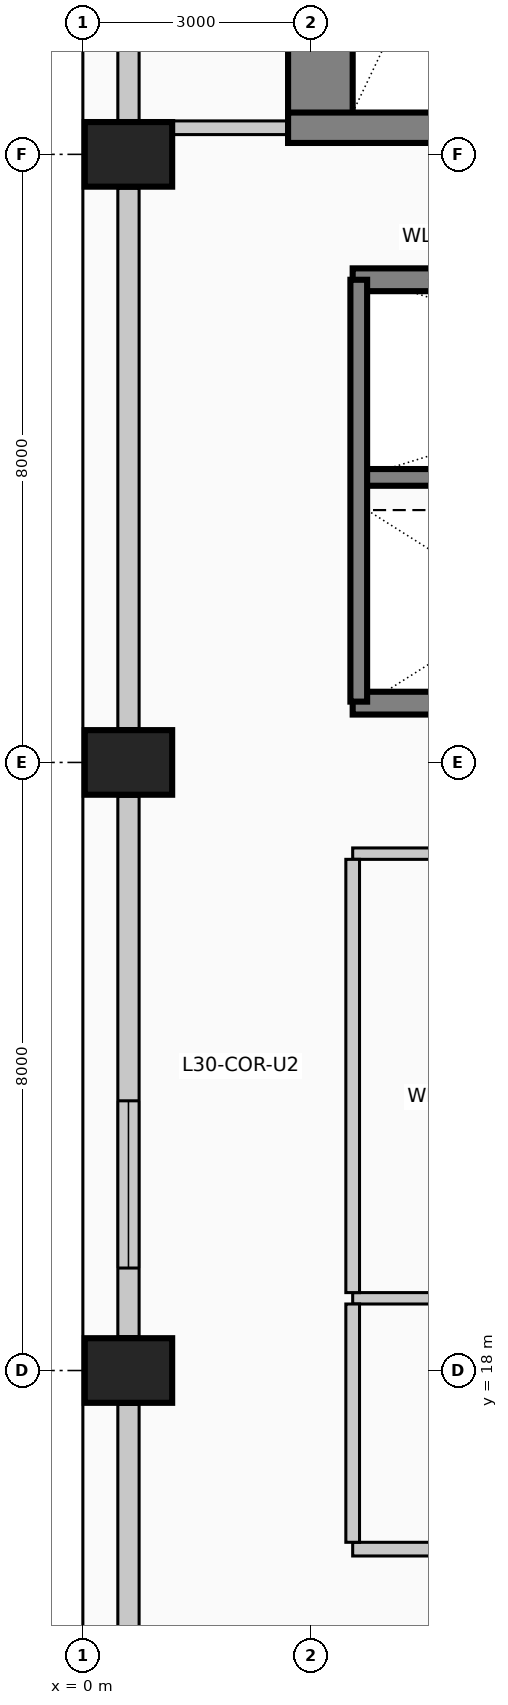
"""IFC4 building model, lengths in metres.
Left out: names, types, materials, properties, quantities, classifications, styles, units other than length and angle.
Written with IfcOpenShell. Run it as: python <this file> out.ifc"""

import sys

from ifc_helpers import new_model, si_unit, direction, frame, frame_2d, origin, origin_2d, place, context, subcontext, project, spatial, rectangle, extrude, element, fill, save


model = new_model("IFC4")
c1 = context("Model", 3, precision=1e-05, world=origin(), true_north=direction((0.0, 1.0)))
c2 = subcontext(c1, "Body", "Model", "MODEL_VIEW")
j1 = project(units=[si_unit("LENGTHUNIT", "METRE"), si_unit("PLANEANGLEUNIT", "RADIAN")], contexts=[c1])
p1 = place(None, origin())
s1 = spatial("IfcSite", under=j1, at=p1, CompositionType="ELEMENT")
p2 = place(p1, origin())
s2 = spatial("IfcBuilding", under=s1, at=p2, CompositionType="ELEMENT")
p3 = place(p2, frame((0.0, 0.0, 124.6)))
s3 = spatial("IfcBuildingStorey", under=s2, at=p3, CompositionType="ELEMENT", Elevation=124.6)
p4 = place(p3, frame((3.125, 34.15, 0.0), z_axis=(0.0, 0.0, 1.0), x_axis=(0.0, 1.0, 0.0)))
e1 = element("IfcWall", 1, at=p4, inside=s3, PredefinedType="SHEAR", context=c2, shape_type="SweptSolid", body=[
    extrude(rectangle(XDim=9.13, YDim=0.85, at=frame_2d((4.565, 0.0))), origin(), (0.0, 0.0, 1.0), 4.0),
])
p5 = place(p3, frame((2.7, 34.35, 0.0), z_axis=(0.0, 0.0, 1.0), x_axis=(1.0, 0.0, 0.0)))
e2 = element("IfcWall", 2, at=p5, inside=s3, PredefinedType="SHEAR", context=c2, shape_type="SweptSolid", body=[
    extrude(rectangle(XDim=5.01, YDim=0.4, at=frame_2d((2.505, 0.0))), origin(), (0.0, 0.0, 1.0), 4.0),
])
p6 = place(p5, frame((2.4, 0.0, 0.0)))
e3 = element("IfcOpeningElement", 3, at=p6, cuts=e2, PredefinedType="OPENING", context=c2, shape_type="SweptSolid", body=[
    extrude(rectangle(XDim=1.15, YDim=2.2, at=frame_2d((0.575, 1.1))), frame((0.0, 0.21, 0.0), z_axis=(0.0, -1.0, 0.0), x_axis=(1.0, 0.0, 0.0)), (0.0, 0.0, 1.0), 0.42),
])
for number, where, z_axis, x_axis in (
    (4, (0.6, 18.0, 0.0), (0.0, 0.0, 1.0), (0.0, 1.0, 0.0)),
    (5, (0.6, 26.0, 0.0), (0.0, 0.0, 1.0), (0.0, 1.0, 0.0)),
    (6, (0.6, 34.0, 0.0), (0.0, 0.0, 1.0), (0.0, 1.0, 0.0)),
):
    element("IfcColumn", number, at=place(p3, frame(where, z_axis=z_axis, x_axis=x_axis)), inside=s3, PredefinedType="COLUMN", context=c2, shape_type="SweptSolid", body=[
        extrude(rectangle(XDim=0.85, YDim=1.15, at=origin_2d()), origin(), (0.0, 0.0, 1.0), 4.0),
    ])
p7 = place(p3, frame((0.6, 10.445, 0.0), z_axis=(0.0, 0.0, 1.0), x_axis=(0.0, 1.0, 0.0)))
e7 = element("IfcWall", 7, at=p7, inside=s3, PredefinedType="SOLIDWALL", context=c2, shape_type="SweptSolid", body=[
    extrude(rectangle(XDim=7.11, YDim=0.28, at=frame_2d((3.555, 0.0))), origin(), (0.0, 0.0, 1.0), 2.875),
])
p8 = place(p3, frame((0.6, 18.445, 0.0), z_axis=(0.0, 0.0, 1.0), x_axis=(0.0, 1.0, 0.0)))
e8 = element("IfcWall", 8, at=p8, inside=s3, PredefinedType="SOLIDWALL", context=c2, shape_type="SweptSolid", body=[
    extrude(rectangle(XDim=7.11, YDim=0.28, at=frame_2d((3.555, 0.0))), origin(), (0.0, 0.0, 1.0), 2.875),
])
p9 = place(p8, frame((0.903, 0.0, 0.5)))
e9 = element("IfcOpeningElement", 9, at=p9, cuts=e8, PredefinedType="OPENING", context=c2, shape_type="SweptSolid", body=[
    extrude(rectangle(XDim=2.2, YDim=1.95, at=frame_2d((1.1, 0.975))), frame((0.0, 0.15, 0.0), z_axis=(0.0, -1.0, 0.0), x_axis=(1.0, 0.0, 0.0)), (0.0, 0.0, 1.0), 0.3),
])
p10 = place(p3, frame((0.6, 26.445, 0.0), z_axis=(0.0, 0.0, 1.0), x_axis=(0.0, 1.0, 0.0)))
e10 = element("IfcWall", 10, at=p10, inside=s3, PredefinedType="SOLIDWALL", context=c2, shape_type="SweptSolid", body=[
    extrude(rectangle(XDim=7.11, YDim=0.28, at=frame_2d((3.555, 0.0))), origin(), (0.0, 0.0, 1.0), 2.875),
])
p11 = place(p3, frame((0.6, 34.445, 0.0), z_axis=(0.0, 0.0, 1.0), x_axis=(0.0, 1.0, 0.0)))
e11 = element("IfcWall", 11, at=p11, inside=s3, PredefinedType="SOLIDWALL", context=c2, shape_type="SweptSolid", body=[
    extrude(rectangle(XDim=7.51, YDim=0.28, at=frame_2d((3.755, 0.0))), origin(), (0.0, 0.0, 1.0), 2.875),
])
for number, where, z_axis, x_axis in (
    (12, (3.55, 32.35, 0.0), (0.0, 0.0, 1.0), (1.0, 0.0, 0.0)),
    (13, (5.65, 26.78, 0.0), (0.0, 0.0, 1.0), (-1.0, 0.0, 0.0)),
):
    element("IfcWall", number, at=place(p3, frame(where, z_axis=z_axis, x_axis=x_axis)), inside=s3, PredefinedType="SOLIDWALL", context=c2, shape_type="SweptSolid", body=[
        extrude(rectangle(XDim=2.1, YDim=0.3, at=frame_2d((1.05, 0.0))), origin(), (0.0, 0.0, 1.0), 4.0),
    ])
p12 = place(p3, frame((3.55, 29.75, 0.0), z_axis=(0.0, 0.0, 1.0), x_axis=(1.0, 0.0, 0.0)))
e14 = element("IfcWall", 14, at=p12, inside=s3, PredefinedType="SOLIDWALL", context=c2, shape_type="SweptSolid", body=[
    extrude(rectangle(XDim=8.65, YDim=0.22, at=frame_2d((4.325, 0.0))), origin(), (0.0, 0.0, 1.0), 4.0),
])
p13 = place(p3, frame((3.63, 26.8, 0.0), z_axis=(0.0, 0.0, 1.0), x_axis=(0.0, 1.0, 0.0)))
e15 = element("IfcWall", 15, at=p13, inside=s3, PredefinedType="SOLIDWALL", context=c2, shape_type="SweptSolid", body=[
    extrude(rectangle(XDim=5.55, YDim=0.22, at=frame_2d((2.775, 0.0))), origin(), (0.0, 0.0, 1.0), 4.0),
])
p14 = place(p3, frame((3.55, 15.65, 0.0), z_axis=(0.0, 0.0, 1.0), x_axis=(1.0, 0.0, 0.0)))
e16 = element("IfcWall", 16, at=p14, inside=s3, PredefinedType="PARTITIONING", context=c2, shape_type="SweptSolid", body=[
    extrude(rectangle(XDim=3.85, YDim=0.18, at=frame_2d((1.925, 0.0))), origin(), (0.0, 0.0, 1.0), 3.725),
])
p15 = place(p14, frame((1.4, 0.0, 0.0)))
e17 = element("IfcOpeningElement", 17, at=p15, cuts=e16, PredefinedType="OPENING", context=c2, shape_type="SweptSolid", body=[
    extrude(rectangle(XDim=1.05, YDim=2.15, at=frame_2d((0.525, 1.075))), frame((0.0, 0.1, 0.0), z_axis=(0.0, -1.0, 0.0), x_axis=(1.0, 0.0, 0.0)), (0.0, 0.0, 1.0), 0.2),
])
p16 = place(p3, frame((3.55, 18.95, 0.0), z_axis=(0.0, 0.0, 1.0), x_axis=(1.0, 0.0, 0.0)))
e18 = element("IfcWall", 18, at=p16, inside=s3, PredefinedType="PARTITIONING", context=c2, shape_type="SweptSolid", body=[
    extrude(rectangle(XDim=3.85, YDim=0.15, at=frame_2d((1.925, 0.0))), origin(), (0.0, 0.0, 1.0), 3.725),
])
p17 = place(p3, frame((3.55, 24.8, 0.0), z_axis=(0.0, 0.0, 1.0), x_axis=(1.0, 0.0, 0.0)))
e19 = element("IfcWall", 19, at=p17, inside=s3, PredefinedType="PARTITIONING", context=c2, shape_type="SweptSolid", body=[
    extrude(rectangle(XDim=6.25, YDim=0.15, at=frame_2d((3.125, 0.0))), origin(), (0.0, 0.0, 1.0), 3.725),
])
p18 = place(p17, frame((2.6, 0.0, 0.0)))
e20 = element("IfcOpeningElement", 20, at=p18, cuts=e19, PredefinedType="OPENING", context=c2, shape_type="SweptSolid", body=[
    extrude(rectangle(XDim=1.05, YDim=2.15, at=frame_2d((0.525, 1.075))), frame((0.0, 0.085, 0.0), z_axis=(0.0, -1.0, 0.0), x_axis=(1.0, 0.0, 0.0)), (0.0, 0.0, 1.0), 0.17),
])
p19 = place(p3, frame((1.175, 34.35, 0.0), z_axis=(0.0, 0.0, 1.0), x_axis=(1.0, 0.0, 0.0)))
e21 = element("IfcWall", 21, at=p19, inside=s3, PredefinedType="PARTITIONING", context=c2, shape_type="SweptSolid", body=[
    extrude(rectangle(XDim=1.525, YDim=0.18, at=frame_2d((0.762, 0.0))), origin(), (0.0, 0.0, 1.0), 3.725),
])
p20 = place(p3, frame((3.55, 15.74, 0.0), z_axis=(0.0, 0.0, 1.0), x_axis=(0.0, 1.0, 0.0)))
e22 = element("IfcWall", 22, at=p20, inside=s3, PredefinedType="PARTITIONING", context=c2, shape_type="SweptSolid", body=[
    extrude(rectangle(XDim=3.135, YDim=0.18, at=frame_2d((1.567, 0.0))), origin(), (0.0, 0.0, 1.0), 3.725),
])
p21 = place(p3, frame((3.55, 19.025, 0.0), z_axis=(0.0, 0.0, 1.0), x_axis=(0.0, 1.0, 0.0)))
e23 = element("IfcWall", 23, at=p21, inside=s3, PredefinedType="PARTITIONING", context=c2, shape_type="SweptSolid", body=[
    extrude(rectangle(XDim=5.7, YDim=0.18, at=frame_2d((2.85, 0.0))), origin(), (0.0, 0.0, 1.0), 3.725),
])
p22 = place(p9, origin())
e24 = element("IfcWindow", 24, at=p22, inside=s3, PartitioningType="SINGLE_PANEL", PredefinedType="WINDOW", context=c2, shape_type="SweptSolid", body=[
    extrude(rectangle(XDim=2.2, YDim=1.95, at=frame_2d((1.1, 0.975))), frame((0.0, 0.03, 0.0), z_axis=(0.0, -1.0, 0.0), x_axis=(1.0, 0.0, 0.0)), (0.0, 0.0, 1.0), 0.06),
])
fill(e9, e24)
save(model, sys.argv[1])
